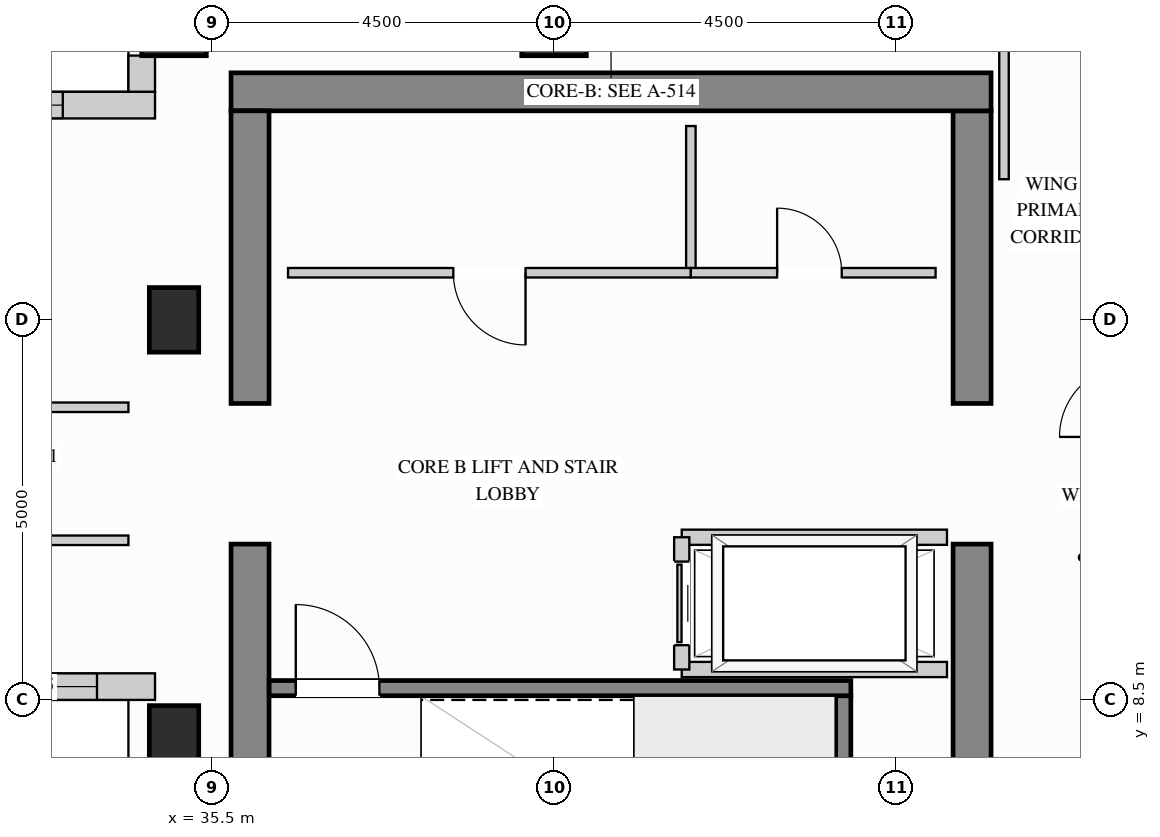
"""IFC4 building model, lengths in metres.
Left out: names, types, materials, properties, quantities, classifications, styles, units other than length and angle.
Written with IfcOpenShell. Run it as: python <this file> out.ifc"""

import sys

from ifc_helpers import new_model, si_unit, direction, frame, frame_2d, origin, origin_2d, place, context, subcontext, project, spatial, rectangle, extrude, source, transform, mapped, element, fill, save


model = new_model("IFC4")
c1 = context("Model", 3, precision=1e-05, world=origin(), true_north=direction((0.0, 1.0)))
c2 = subcontext(c1, "Body", "Model", "MODEL_VIEW")
j1 = project(units=[si_unit("LENGTHUNIT", "METRE"), si_unit("PLANEANGLEUNIT", "RADIAN")], contexts=[c1])
p1 = place(None, origin())
s1 = spatial("IfcSite", under=j1, at=p1, CompositionType="ELEMENT")
p2 = place(p1, origin())
s2 = spatial("IfcBuilding", under=s1, at=p2, CompositionType="ELEMENT")
p3 = place(p2, frame((0.0, 0.0, 230.4)))
s3 = spatial("IfcBuildingStorey", under=s2, at=p3, CompositionType="ELEMENT", Elevation=230.4)
m1 = source(origin(), c2, "Body", "SweptSolid", [
    extrude(rectangle(XDim=0.65, YDim=0.85, at=origin_2d()), origin(), (0.0, 0.0, 1.0), 3.4),
])
for number, where, z_axis, x_axis in (
    (1, (35.0, 13.5, 0.0), (0.0, 0.0, 1.0), (1.0, 0.0, 0.0)),
    (2, (35.0, 8.0, 0.0), (0.0, 0.0, 1.0), (1.0, 0.0, 0.0)),
):
    element("IfcColumn", number, at=place(p3, frame(where, z_axis=z_axis, x_axis=x_axis)), inside=s3, PredefinedType="COLUMN", context=c2, shape_type="MappedRepresentation", body=[
        mapped(m1, transform((0.0, 0.0, 0.0), x_axis=(1.0, 0.0, 0.0), y_axis=(0.0, 1.0, 0.0), z_axis=(0.0, 0.0, 1.0))),
    ])
m2 = source(origin(), c2, "Body", "SweptSolid", [
    extrude(rectangle(XDim=0.85, YDim=0.85, at=origin_2d()), origin(), (0.0, 0.0, 1.0), 3.4),
])
for number, where, z_axis, x_axis in (
    (3, (35.0, 17.4, 0.0), (0.0, 0.0, 1.0), (1.0, 0.0, 0.0)),
    (4, (40.0, 17.4, 0.0), (0.0, 0.0, 1.0), (1.0, 0.0, 0.0)),
):
    element("IfcColumn", number, at=place(p3, frame(where, z_axis=z_axis, x_axis=x_axis)), inside=s3, PredefinedType="COLUMN", context=c2, shape_type="MappedRepresentation", body=[
        mapped(m2, transform((0.0, 0.0, 0.0), x_axis=(1.0, 0.0, 0.0), y_axis=(0.0, 1.0, 0.0), z_axis=(0.0, 0.0, 1.0))),
    ])
m3 = source(origin(), c2, "Body", "SweptSolid", [
    extrude(rectangle(XDim=5.8, YDim=0.5, at=frame_2d((2.9, 0.0))), origin(), (0.0, 0.0, 1.0), 3.4),
])
p4 = place(p3, frame((45.5, 4.75, 0.0), z_axis=(0.0, 0.0, 1.0), x_axis=(0.0, 1.0, 0.0)))
e5 = element("IfcWall", 5, at=p4, inside=s3, PredefinedType="SHEAR", context=c2, shape_type="MappedRepresentation", body=[
    mapped(m3, transform((0.0, 0.0, 0.0), x_axis=(1.0, 0.0, 0.0), y_axis=(0.0, 1.0, 0.0), z_axis=(0.0, 0.0, 1.0))),
])
m4 = source(origin(), c2, "Body", "SweptSolid", [
    extrude(rectangle(XDim=3.85, YDim=0.5, at=frame_2d((1.925, 0.0))), origin(), (0.0, 0.0, 1.0), 3.4),
])
p5 = place(p3, frame((45.5, 12.4, 0.0), z_axis=(0.0, 0.0, 1.0), x_axis=(0.0, 1.0, 0.0)))
e6 = element("IfcWall", 6, at=p5, inside=s3, PredefinedType="SHEAR", context=c2, shape_type="MappedRepresentation", body=[
    mapped(m4, transform((0.0, 0.0, 0.0), x_axis=(1.0, 0.0, 0.0), y_axis=(0.0, 1.0, 0.0), z_axis=(0.0, 0.0, 1.0))),
])
m5 = source(origin(), c2, "Body", "SweptSolid", [
    extrude(rectangle(XDim=10.0, YDim=0.5, at=frame_2d((5.0, 0.0))), origin(), (0.0, 0.0, 1.0), 3.4),
])
p6 = place(p3, frame((35.75, 16.5, 0.0), z_axis=(0.0, 0.0, 1.0), x_axis=(1.0, 0.0, 0.0)))
e7 = element("IfcWall", 7, at=p6, inside=s3, PredefinedType="SHEAR", context=c2, shape_type="MappedRepresentation", body=[
    mapped(m5, transform((0.0, 0.0, 0.0), x_axis=(1.0, 0.0, 0.0), y_axis=(0.0, 1.0, 0.0), z_axis=(0.0, 0.0, 1.0))),
])
p7 = place(p3, frame((36.0, 4.75, 0.0), z_axis=(0.0, 0.0, 1.0), x_axis=(0.0, 1.0, 0.0)))
e8 = element("IfcWall", 8, at=p7, inside=s3, PredefinedType="SHEAR", context=c2, shape_type="MappedRepresentation", body=[
    mapped(m3, transform((0.0, 0.0, 0.0), x_axis=(1.0, 0.0, 0.0), y_axis=(0.0, 1.0, 0.0), z_axis=(0.0, 0.0, 1.0))),
])
p8 = place(p3, frame((36.0, 12.4, 0.0), z_axis=(0.0, 0.0, 1.0), x_axis=(0.0, 1.0, 0.0)))
e9 = element("IfcWall", 9, at=p8, inside=s3, PredefinedType="SHEAR", context=c2, shape_type="MappedRepresentation", body=[
    mapped(m4, transform((0.0, 0.0, 0.0), x_axis=(1.0, 0.0, 0.0), y_axis=(0.0, 1.0, 0.0), z_axis=(0.0, 0.0, 1.0))),
])
p9 = place(p3, frame((19.323, 8.675, 0.0), z_axis=(0.0, 0.0, 1.0), x_axis=(1.0, 0.0, 0.0)))
e10 = element("IfcWall", 10, at=p9, inside=s3, PredefinedType="SOLIDWALL", context=c2, shape_type="SweptSolid", body=[
    extrude(rectangle(XDim=15.427, YDim=0.35, at=frame_2d((7.713, 0.0))), origin(), (0.0, 0.0, 1.0), 3.385),
])
p10 = place(p9, frame((0.639, 0.0, 0.78)))
e11 = element("IfcOpeningElement", 11, at=p10, cuts=e10, PredefinedType="OPENING", context=c2, shape_type="SweptSolid", body=[
    extrude(rectangle(XDim=1.5, YDim=2.0, at=frame_2d((0.75, 1.0))), frame((0.0, 0.185, 0.0), z_axis=(0.0, -1.0, 0.0), x_axis=(1.0, 0.0, 0.0)), (0.0, 0.0, 1.0), 0.37),
])
p11 = place(p9, frame((2.458, 0.0, 0.78)))
e12 = element("IfcOpeningElement", 12, at=p11, cuts=e10, PredefinedType="OPENING", context=c2, shape_type="SweptSolid", body=[
    extrude(rectangle(XDim=1.5, YDim=2.0, at=frame_2d((0.75, 1.0))), frame((0.0, 0.185, 0.0), z_axis=(0.0, -1.0, 0.0), x_axis=(1.0, 0.0, 0.0)), (0.0, 0.0, 1.0), 0.37),
])
p12 = place(p9, frame((5.61, 0.0, 0.78)))
e13 = element("IfcOpeningElement", 13, at=p12, cuts=e10, PredefinedType="OPENING", context=c2, shape_type="SweptSolid", body=[
    extrude(rectangle(XDim=1.5, YDim=2.0, at=frame_2d((0.75, 1.0))), frame((0.0, 0.185, 0.0), z_axis=(0.0, -1.0, 0.0), x_axis=(1.0, 0.0, 0.0)), (0.0, 0.0, 1.0), 0.37),
])
p13 = place(p9, frame((7.944, 0.0, 0.78)))
e14 = element("IfcOpeningElement", 14, at=p13, cuts=e10, PredefinedType="OPENING", context=c2, shape_type="SweptSolid", body=[
    extrude(rectangle(XDim=1.5, YDim=2.0, at=frame_2d((0.75, 1.0))), frame((0.0, 0.185, 0.0), z_axis=(0.0, -1.0, 0.0), x_axis=(1.0, 0.0, 0.0)), (0.0, 0.0, 1.0), 0.37),
])
p14 = place(p9, frame((11.22, 0.0, 0.78)))
e15 = element("IfcOpeningElement", 15, at=p14, cuts=e10, PredefinedType="OPENING", context=c2, shape_type="SweptSolid", body=[
    extrude(rectangle(XDim=1.5, YDim=2.0, at=frame_2d((0.75, 1.0))), frame((0.0, 0.185, 0.0), z_axis=(0.0, -1.0, 0.0), x_axis=(1.0, 0.0, 0.0)), (0.0, 0.0, 1.0), 0.37),
])
p15 = place(p9, frame((13.164, 0.0, 0.78)))
e16 = element("IfcOpeningElement", 16, at=p15, cuts=e10, PredefinedType="OPENING", context=c2, shape_type="SweptSolid", body=[
    extrude(rectangle(XDim=1.5, YDim=2.0, at=frame_2d((0.75, 1.0))), frame((0.0, 0.185, 0.0), z_axis=(0.0, -1.0, 0.0), x_axis=(1.0, 0.0, 0.0)), (0.0, 0.0, 1.0), 0.37),
])
m6 = source(origin(), c2, "Body", "SweptSolid", [
    extrude(rectangle(XDim=0.479, YDim=0.35, at=frame_2d((0.24, 0.0))), origin(), (0.0, 0.0, 1.0), 3.385),
])
p16 = place(p3, frame((34.575, 16.977, 0.0), z_axis=(0.0, 0.0, 1.0), x_axis=(0.0, -1.0, 0.0)))
e17 = element("IfcWall", 17, at=p16, inside=s3, PredefinedType="SOLIDWALL", context=c2, shape_type="MappedRepresentation", body=[
    mapped(m6, transform((0.0, 0.0, 0.0), x_axis=(1.0, 0.0, 0.0), y_axis=(0.0, 1.0, 0.0), z_axis=(0.0, 0.0, 1.0))),
])
p17 = place(p3, frame((34.75, 16.325, 0.0), z_axis=(0.0, 0.0, 1.0), x_axis=(-1.0, 0.0, 0.0)))
e18 = element("IfcWall", 18, at=p17, inside=s3, PredefinedType="SOLIDWALL", context=c2, shape_type="SweptSolid", body=[
    extrude(rectangle(XDim=3.927, YDim=0.35, at=frame_2d((1.963, 0.0))), origin(), (0.0, 0.0, 1.0), 3.385),
])
p18 = place(p17, frame((1.213, 0.0, 0.78)))
e19 = element("IfcOpeningElement", 19, at=p18, cuts=e18, PredefinedType="OPENING", context=c2, shape_type="SweptSolid", body=[
    extrude(rectangle(XDim=1.5, YDim=2.0, at=frame_2d((0.75, 1.0))), frame((0.0, 0.185, 0.0), z_axis=(0.0, -1.0, 0.0), x_axis=(1.0, 0.0, 0.0)), (0.0, 0.0, 1.0), 0.37),
])
m7 = source(origin(), c2, "Body", "SweptSolid", [
    extrude(rectangle(XDim=1.93, YDim=0.125, at=frame_2d((0.965, 0.0))), origin(), (0.0, 0.0, 1.0), 3.385),
])
p19 = place(p3, frame((41.8, 14.12, 0.0), z_axis=(0.0, 0.0, 1.0), x_axis=(0.0, 1.0, 0.0)))
e20 = element("IfcWall", 20, at=p19, inside=s3, PredefinedType="PARTITIONING", context=c2, shape_type="MappedRepresentation", body=[
    mapped(m7, transform((0.0, 0.0, 0.0), x_axis=(1.0, 0.0, 0.0), y_axis=(0.0, 1.0, 0.0), z_axis=(0.0, 0.0, 1.0))),
])
p20 = place(p3, frame((36.5, 14.12, 0.0), z_axis=(0.0, 0.0, 1.0), x_axis=(1.0, 0.0, 0.0)))
e21 = element("IfcWall", 21, at=p20, inside=s3, PredefinedType="PARTITIONING", context=c2, shape_type="SweptSolid", body=[
    extrude(rectangle(XDim=5.3, YDim=0.125, at=frame_2d((2.65, 0.0))), origin(), (0.0, 0.0, 1.0), 3.385),
])
p21 = place(p20, frame((2.175, 0.0, 0.0)))
e22 = element("IfcOpeningElement", 22, at=p21, cuts=e21, PredefinedType="OPENING", context=c2, shape_type="SweptSolid", body=[
    extrude(rectangle(XDim=0.95, YDim=2.15, at=frame_2d((0.475, 1.075))), frame((0.0, 0.073, 0.0), z_axis=(0.0, -1.0, 0.0), x_axis=(1.0, 0.0, 0.0)), (0.0, 0.0, 1.0), 0.145),
])
p22 = place(p3, frame((41.8, 14.12, 0.0), z_axis=(0.0, 0.0, 1.0), x_axis=(1.0, 0.0, 0.0)))
e23 = element("IfcWall", 23, at=p22, inside=s3, PredefinedType="PARTITIONING", context=c2, shape_type="SweptSolid", body=[
    extrude(rectangle(XDim=3.22, YDim=0.125, at=frame_2d((1.61, 0.0))), origin(), (0.0, 0.0, 1.0), 3.385),
])
p23 = place(p22, frame((1.135, 0.0, 0.0)))
e24 = element("IfcOpeningElement", 24, at=p23, cuts=e23, PredefinedType="OPENING", context=c2, shape_type="SweptSolid", body=[
    extrude(rectangle(XDim=0.85, YDim=2.1, at=frame_2d((0.425, 1.05))), frame((0.0, 0.073, 0.0), z_axis=(0.0, -1.0, 0.0), x_axis=(1.0, 0.0, 0.0)), (0.0, 0.0, 1.0), 0.145),
])
m8 = source(origin(), c2, "Body", "SweptSolid", [
    extrude(rectangle(XDim=2.298, YDim=0.125, at=frame_2d((1.149, 0.0))), origin(), (0.0, 0.0, 1.0), 3.385),
])
p24 = place(p3, frame((45.92, 15.35, 0.0), z_axis=(0.0, 0.0, 1.0), x_axis=(0.0, 1.0, 0.0)))
e25 = element("IfcWall", 25, at=p24, inside=s3, PredefinedType="PARTITIONING", context=c2, shape_type="MappedRepresentation", body=[
    mapped(m8, transform((0.0, 0.0, 0.0), x_axis=(1.0, 0.0, 0.0), y_axis=(0.0, 1.0, 0.0), z_axis=(0.0, 0.0, 1.0))),
])
p25 = place(p3, frame((29.85, 12.35, 0.0), z_axis=(0.0, 0.0, 1.0), x_axis=(1.0, 0.0, 0.0)))
e26 = element("IfcWall", 26, at=p25, inside=s3, PredefinedType="PARTITIONING", context=c2, shape_type="SweptSolid", body=[
    extrude(rectangle(XDim=4.55, YDim=0.125, at=frame_2d((2.275, 0.0))), origin(), (0.0, 0.0, 1.0), 3.385),
])
p26 = place(p25, frame((1.8, 0.0, 0.0)))
e27 = element("IfcOpeningElement", 27, at=p26, cuts=e26, PredefinedType="OPENING", context=c2, shape_type="SweptSolid", body=[
    extrude(rectangle(XDim=0.95, YDim=2.15, at=frame_2d((0.475, 1.075))), frame((0.0, 0.073, 0.0), z_axis=(0.0, -1.0, 0.0), x_axis=(1.0, 0.0, 0.0)), (0.0, 0.0, 1.0), 0.145),
])
p27 = place(p3, frame((29.85, 10.6, 0.0), z_axis=(0.0, 0.0, 1.0), x_axis=(1.0, 0.0, 0.0)))
e28 = element("IfcWall", 28, at=p27, inside=s3, PredefinedType="PARTITIONING", context=c2, shape_type="SweptSolid", body=[
    extrude(rectangle(XDim=4.55, YDim=0.125, at=frame_2d((2.275, 0.0))), origin(), (0.0, 0.0, 1.0), 3.385),
])
p28 = place(p27, frame((1.8, 0.0, 0.0)))
e29 = element("IfcOpeningElement", 29, at=p28, cuts=e28, PredefinedType="OPENING", context=c2, shape_type="SweptSolid", body=[
    extrude(rectangle(XDim=0.95, YDim=2.15, at=frame_2d((0.475, 1.075))), frame((0.0, 0.073, 0.0), z_axis=(0.0, -1.0, 0.0), x_axis=(1.0, 0.0, 0.0)), (0.0, 0.0, 1.0), 0.145),
])
m9 = source(origin(), c2, "Body", "SweptSolid", [
    extrude(rectangle(XDim=3.49, YDim=0.2, at=frame_2d((1.745, 0.0))), origin(), (0.0, 0.0, 1.0), 3.385),
])
for number, where, z_axis, x_axis in (
    (30, (41.68, 10.64, 0.0), (0.0, 0.0, 1.0), (1.0, 0.0, 0.0)),
    (31, (41.68, 8.9, 0.0), (0.0, 0.0, 1.0), (1.0, 0.0, 0.0)),
):
    element("IfcWall", number, at=place(p3, frame(where, z_axis=z_axis, x_axis=x_axis)), inside=s3, PredefinedType="PARTITIONING", context=c2, shape_type="MappedRepresentation", body=[
        mapped(m9, transform((0.0, 0.0, 0.0), x_axis=(1.0, 0.0, 0.0), y_axis=(0.0, 1.0, 0.0), z_axis=(0.0, 0.0, 1.0))),
    ])
p29 = place(p3, frame((41.68, 8.9, 0.0), z_axis=(0.0, 0.0, 1.0), x_axis=(0.0, 1.0, 0.0)))
e32 = element("IfcWall", 32, at=p29, inside=s3, PredefinedType="PARTITIONING", context=c2, shape_type="SweptSolid", body=[
    extrude(rectangle(XDim=1.74, YDim=0.2, at=frame_2d((0.87, 0.0))), origin(), (0.0, 0.0, 1.0), 3.385),
])
p30 = place(p29, frame((0.32, 0.0, 0.0)))
e33 = element("IfcOpeningElement", 33, at=p30, cuts=e32, PredefinedType="OPENING", context=c2, shape_type="SweptSolid", body=[
    extrude(rectangle(XDim=1.1, YDim=2.2, at=frame_2d((0.55, 1.1))), frame((0.0, 0.11, 0.0), z_axis=(0.0, -1.0, 0.0), x_axis=(1.0, 0.0, 0.0)), (0.0, 0.0, 1.0), 0.22),
])
m10 = source(origin(), c2, "Body", "SweptSolid", [
    extrude(rectangle(XDim=3.803, YDim=0.2, at=frame_2d((1.901, 0.0))), origin(), (0.0, 0.0, 1.0), 3.4),
])
p31 = place(p3, frame((43.805, 4.752, 0.0), z_axis=(0.0, 0.0, 1.0), x_axis=(0.0, 1.0, 0.0)))
e34 = element("IfcWall", 34, at=p31, inside=s3, PredefinedType="SHEAR", context=c2, shape_type="MappedRepresentation", body=[
    mapped(m10, transform((0.0, 0.0, 0.0), x_axis=(1.0, 0.0, 0.0), y_axis=(0.0, 1.0, 0.0), z_axis=(0.0, 0.0, 1.0))),
])
p32 = place(p3, frame((36.252, 8.655, 0.0), z_axis=(0.0, 0.0, 1.0), x_axis=(1.0, 0.0, 0.0)))
e35 = element("IfcWall", 35, at=p32, inside=s3, PredefinedType="SHEAR", context=c2, shape_type="SweptSolid", body=[
    extrude(rectangle(XDim=7.653, YDim=0.2, at=frame_2d((3.827, 0.0))), origin(), (0.0, 0.0, 1.0), 3.4),
])
p33 = place(p32, frame((0.35, 0.0, 0.0)))
e36 = element("IfcOpeningElement", 36, at=p33, cuts=e35, PredefinedType="OPENING", context=c2, shape_type="SweptSolid", body=[
    extrude(rectangle(XDim=1.1, YDim=2.15, at=frame_2d((0.55, 1.075))), frame((0.0, 0.11, 0.0), z_axis=(0.0, -1.0, 0.0), x_axis=(1.0, 0.0, 0.0)), (0.0, 0.0, 1.0), 0.22),
])
m11 = source(origin(), c2, "Body", "SweptSolid", [
    extrude(rectangle(XDim=1.1, YDim=2.2, at=frame_2d((0.55, 1.1))), frame((0.0, 0.025, 0.0), z_axis=(0.0, -1.0, 0.0), x_axis=(1.0, 0.0, 0.0)), (0.0, 0.0, 1.0), 0.05),
])
p34 = place(p30, origin())
e37 = element("IfcDoor", 37, at=p34, inside=s3, OperationType="SLIDING_TO_LEFT", PredefinedType="DOOR", context=c2, shape_type="MappedRepresentation", body=[
    mapped(m11, transform((0.0, 0.0, 0.0), x_axis=(1.0, 0.0, 0.0), y_axis=(0.0, 1.0, 0.0), z_axis=(0.0, 0.0, 1.0))),
])
fill(e33, e37)
m12 = source(origin(), c2, "Body", "SweptSolid", [
    extrude(rectangle(XDim=0.95, YDim=2.15, at=frame_2d((0.475, 1.075))), frame((0.0, 0.025, 0.0), z_axis=(0.0, -1.0, 0.0), x_axis=(1.0, 0.0, 0.0)), (0.0, 0.0, 1.0), 0.05),
])
p35 = place(p21, origin())
e38 = element("IfcDoor", 38, at=p35, inside=s3, OperationType="SINGLE_SWING_RIGHT", PredefinedType="DOOR", context=c2, shape_type="MappedRepresentation", body=[
    mapped(m12, transform((0.0, 0.0, 0.0), x_axis=(1.0, 0.0, 0.0), y_axis=(0.0, 1.0, 0.0), z_axis=(0.0, 0.0, 1.0))),
])
fill(e22, e38)
m13 = source(origin(), c2, "Body", "SweptSolid", [
    extrude(rectangle(XDim=0.85, YDim=2.1, at=frame_2d((0.425, 1.05))), frame((0.0, 0.025, 0.0), z_axis=(0.0, -1.0, 0.0), x_axis=(1.0, 0.0, 0.0)), (0.0, 0.0, 1.0), 0.05),
])
p36 = place(p23, origin())
e39 = element("IfcDoor", 39, at=p36, inside=s3, OperationType="SINGLE_SWING_LEFT", PredefinedType="DOOR", context=c2, shape_type="MappedRepresentation", body=[
    mapped(m13, transform((0.0, 0.0, 0.0), x_axis=(1.0, 0.0, 0.0), y_axis=(0.0, 1.0, 0.0), z_axis=(0.0, 0.0, 1.0))),
])
fill(e24, e39)
m14 = source(origin(), c2, "Body", "SweptSolid", [
    extrude(rectangle(XDim=1.1, YDim=2.15, at=frame_2d((0.55, 1.075))), frame((0.0, 0.025, 0.0), z_axis=(0.0, -1.0, 0.0), x_axis=(1.0, 0.0, 0.0)), (0.0, 0.0, 1.0), 0.05),
])
p37 = place(p33, origin())
e40 = element("IfcDoor", 40, at=p37, inside=s3, OperationType="SINGLE_SWING_LEFT", PredefinedType="DOOR", context=c2, shape_type="MappedRepresentation", body=[
    mapped(m14, transform((0.0, 0.0, 0.0), x_axis=(1.0, 0.0, 0.0), y_axis=(0.0, 1.0, 0.0), z_axis=(0.0, 0.0, 1.0))),
])
fill(e36, e40)
m15 = source(origin(), c2, "Body", "SweptSolid", [
    extrude(rectangle(XDim=1.5, YDim=2.0, at=frame_2d((0.75, 1.0))), frame((0.0, 0.03, 0.0), z_axis=(0.0, -1.0, 0.0), x_axis=(1.0, 0.0, 0.0)), (0.0, 0.0, 1.0), 0.06),
])
p38 = place(p15, origin())
e41 = element("IfcWindow", 41, at=p38, inside=s3, PartitioningType="SINGLE_PANEL", PredefinedType="WINDOW", context=c2, shape_type="MappedRepresentation", body=[
    mapped(m15, transform((0.0, 0.0, 0.0), x_axis=(1.0, 0.0, 0.0), y_axis=(0.0, 1.0, 0.0), z_axis=(0.0, 0.0, 1.0))),
])
fill(e16, e41)
p39 = place(p18, origin())
e42 = element("IfcWindow", 42, at=p39, inside=s3, PartitioningType="SINGLE_PANEL", PredefinedType="WINDOW", context=c2, shape_type="MappedRepresentation", body=[
    mapped(m15, transform((0.0, 0.0, 0.0), x_axis=(1.0, 0.0, 0.0), y_axis=(0.0, 1.0, 0.0), z_axis=(0.0, 0.0, 1.0))),
])
fill(e19, e42)
save(model, sys.argv[1])
